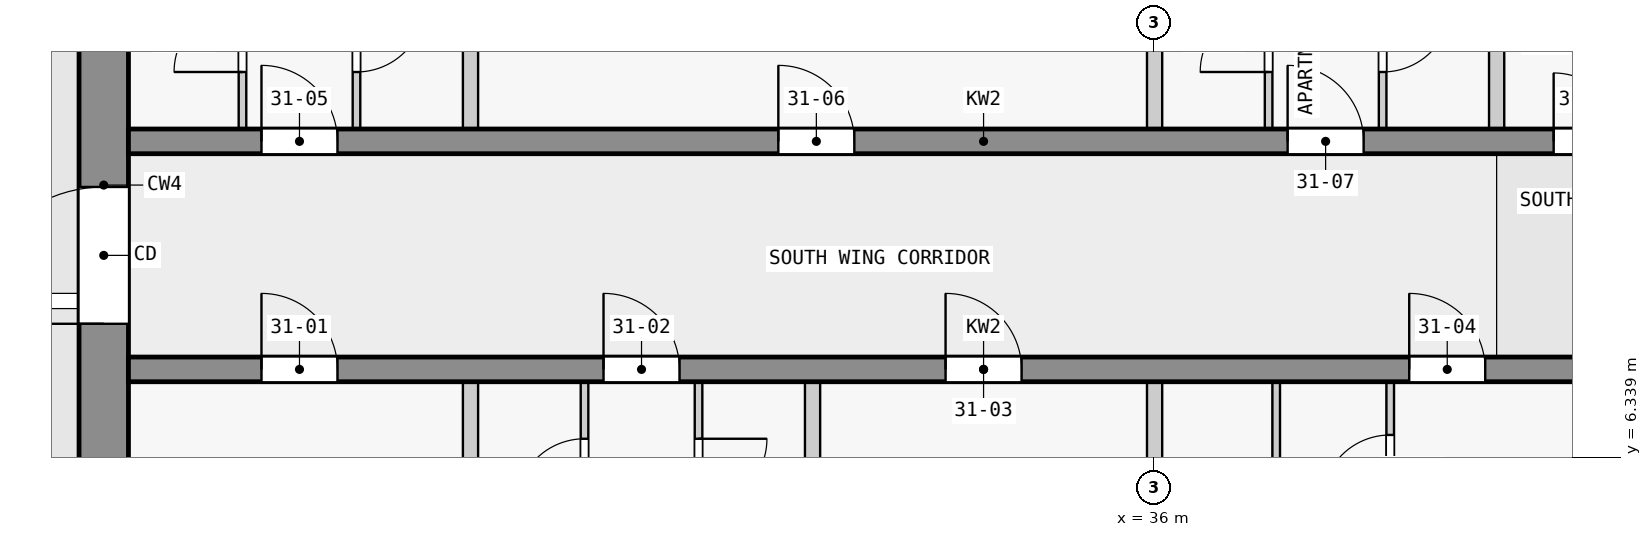
"""IFC4 building model, lengths in metres.
Left out: names, types, materials, properties, quantities, classifications, styles, units other than length and angle.
Written with IfcOpenShell. Run it as: python <this file> out.ifc"""

import sys

from ifc_helpers import new_model, si_unit, direction, frame, frame_2d, origin, place, context, subcontext, project, spatial, rectangle, extrude, element, fill, save


model = new_model("IFC4")
c1 = context("Model", 3, precision=1e-05, world=origin(), true_north=direction((0.0, 1.0)))
c2 = subcontext(c1, "Body", "Model", "MODEL_VIEW")
j1 = project(units=[si_unit("LENGTHUNIT", "METRE"), si_unit("PLANEANGLEUNIT", "RADIAN")], contexts=[c1])
p1 = place(None, origin())
s1 = spatial("IfcSite", under=j1, at=p1, CompositionType="ELEMENT")
p2 = place(p1, origin())
s2 = spatial("IfcBuilding", under=s1, at=p2, CompositionType="ELEMENT")
p3 = place(p2, frame((0.0, 0.0, 120.3)))
s3 = spatial("IfcBuildingStorey", under=s2, at=p3, CompositionType="ELEMENT", Elevation=120.3)
p4 = place(p3, frame((22.175, 2.5, 0.0), z_axis=(0.0, 0.0, 1.0), x_axis=(0.0, 1.0, 0.0)))
e1 = element("IfcWall", 1, at=p4, inside=s3, PredefinedType="SHEAR", context=c2, shape_type="SweptSolid", body=[
    extrude(rectangle(XDim=14.85, YDim=0.65, at=frame_2d((7.425, 0.0))), origin(), (0.0, 0.0, 1.0), 3.2),
])
p5 = place(p4, frame((5.6, 0.0, 0.0)))
e2 = element("IfcOpeningElement", 2, at=p5, cuts=e1, PredefinedType="OPENING", context=c2, shape_type="SweptSolid", body=[
    extrude(rectangle(XDim=1.8, YDim=2.1, at=frame_2d((0.9, 1.05))), frame((0.0, 0.335, 0.0), z_axis=(0.0, -1.0, 0.0), x_axis=(1.0, 0.0, 0.0)), (0.0, 0.0, 1.0), 0.67),
])
p6 = place(p3, frame((22.5, 7.5, 0.0), z_axis=(0.0, 0.0, 1.0), x_axis=(1.0, 0.0, 0.0)))
e3 = element("IfcWall", 3, at=p6, inside=s3, PredefinedType="SHEAR", context=c2, shape_type="SweptSolid", body=[
    extrude(rectangle(XDim=22.5, YDim=0.325, at=frame_2d((11.25, 0.0))), origin(), (0.0, 0.0, 1.0), 3.2),
])
p7 = place(p6, frame((1.75, 0.0, 0.0)))
e4 = element("IfcOpeningElement", 4, at=p7, cuts=e3, PredefinedType="OPENING", context=c2, shape_type="SweptSolid", body=[
    extrude(rectangle(XDim=1.0, YDim=2.1, at=frame_2d((0.5, 1.05))), frame((0.0, 0.172, 0.0), z_axis=(0.0, -1.0, 0.0), x_axis=(1.0, 0.0, 0.0)), (0.0, 0.0, 1.0), 0.345),
])
p8 = place(p6, frame((6.25, 0.0, 0.0)))
e5 = element("IfcOpeningElement", 5, at=p8, cuts=e3, PredefinedType="OPENING", context=c2, shape_type="SweptSolid", body=[
    extrude(rectangle(XDim=1.0, YDim=2.1, at=frame_2d((0.5, 1.05))), frame((0.0, 0.172, 0.0), z_axis=(0.0, -1.0, 0.0), x_axis=(1.0, 0.0, 0.0)), (0.0, 0.0, 1.0), 0.345),
])
p9 = place(p6, frame((10.75, 0.0, 0.0)))
e6 = element("IfcOpeningElement", 6, at=p9, cuts=e3, PredefinedType="OPENING", context=c2, shape_type="SweptSolid", body=[
    extrude(rectangle(XDim=1.0, YDim=2.1, at=frame_2d((0.5, 1.05))), frame((0.0, 0.172, 0.0), z_axis=(0.0, -1.0, 0.0), x_axis=(1.0, 0.0, 0.0)), (0.0, 0.0, 1.0), 0.345),
])
p10 = place(p6, frame((16.85, 0.0, 0.0)))
e7 = element("IfcOpeningElement", 7, at=p10, cuts=e3, PredefinedType="OPENING", context=c2, shape_type="SweptSolid", body=[
    extrude(rectangle(XDim=1.0, YDim=2.1, at=frame_2d((0.5, 1.05))), frame((0.0, 0.172, 0.0), z_axis=(0.0, -1.0, 0.0), x_axis=(1.0, 0.0, 0.0)), (0.0, 0.0, 1.0), 0.345),
])
p11 = place(p3, frame((22.5, 10.5, 0.0), z_axis=(0.0, 0.0, 1.0), x_axis=(1.0, 0.0, 0.0)))
e8 = element("IfcWall", 8, at=p11, inside=s3, PredefinedType="SHEAR", context=c2, shape_type="SweptSolid", body=[
    extrude(rectangle(XDim=22.5, YDim=0.325, at=frame_2d((11.25, 0.0))), origin(), (0.0, 0.0, 1.0), 3.2),
])
p12 = place(p11, frame((1.75, 0.0, 0.0)))
e9 = element("IfcOpeningElement", 9, at=p12, cuts=e8, PredefinedType="OPENING", context=c2, shape_type="SweptSolid", body=[
    extrude(rectangle(XDim=1.0, YDim=2.1, at=frame_2d((0.5, 1.05))), frame((0.0, 0.172, 0.0), z_axis=(0.0, -1.0, 0.0), x_axis=(1.0, 0.0, 0.0)), (0.0, 0.0, 1.0), 0.345),
])
p13 = place(p11, frame((8.55, 0.0, 0.0)))
e10 = element("IfcOpeningElement", 10, at=p13, cuts=e8, PredefinedType="OPENING", context=c2, shape_type="SweptSolid", body=[
    extrude(rectangle(XDim=1.0, YDim=2.1, at=frame_2d((0.5, 1.05))), frame((0.0, 0.172, 0.0), z_axis=(0.0, -1.0, 0.0), x_axis=(1.0, 0.0, 0.0)), (0.0, 0.0, 1.0), 0.345),
])
p14 = place(p11, frame((15.25, 0.0, 0.0)))
e11 = element("IfcOpeningElement", 11, at=p14, cuts=e8, PredefinedType="OPENING", context=c2, shape_type="SweptSolid", body=[
    extrude(rectangle(XDim=1.0, YDim=2.1, at=frame_2d((0.5, 1.05))), frame((0.0, 0.172, 0.0), z_axis=(0.0, -1.0, 0.0), x_axis=(1.0, 0.0, 0.0)), (0.0, 0.0, 1.0), 0.345),
])
p15 = place(p11, frame((18.75, 0.0, 0.0)))
e12 = element("IfcOpeningElement", 12, at=p15, cuts=e8, PredefinedType="OPENING", context=c2, shape_type="SweptSolid", body=[
    extrude(rectangle(XDim=0.9, YDim=2.1, at=frame_2d((0.45, 1.05))), frame((0.0, 0.172, 0.0), z_axis=(0.0, -1.0, 0.0), x_axis=(1.0, 0.0, 0.0)), (0.0, 0.0, 1.0), 0.345),
])
p16 = place(p11, frame((20.95, 0.0, 0.0)))
e13 = element("IfcOpeningElement", 13, at=p16, cuts=e8, PredefinedType="OPENING", context=c2, shape_type="SweptSolid", body=[
    extrude(rectangle(XDim=1.0, YDim=2.1, at=frame_2d((0.5, 1.05))), frame((0.0, 0.172, 0.0), z_axis=(0.0, -1.0, 0.0), x_axis=(1.0, 0.0, 0.0)), (0.0, 0.0, 1.0), 0.345),
])
p17 = place(p3, frame((24.0, 10.663, 0.0), z_axis=(0.0, 0.0, 1.0), x_axis=(0.0, 1.0, 0.0)))
e14 = element("IfcWall", 14, at=p17, inside=s3, PredefinedType="PARTITIONING", context=c2, shape_type="SweptSolid", body=[
    extrude(rectangle(XDim=2.4, YDim=0.1, at=frame_2d((1.2, 0.0))), origin(), (0.0, 0.0, 1.0), 3.2),
])
p18 = place(p17, frame((0.75, 0.0, 0.0)))
e15 = element("IfcOpeningElement", 15, at=p18, cuts=e14, PredefinedType="OPENING", context=c2, shape_type="SweptSolid", body=[
    extrude(rectangle(XDim=0.9, YDim=2.1, at=frame_2d((0.45, 1.05))), frame((0.0, 0.06, 0.0), z_axis=(0.0, -1.0, 0.0), x_axis=(1.0, 0.0, 0.0)), (0.0, 0.0, 1.0), 0.12),
])
p19 = place(p3, frame((25.5, 13.062, 0.0), z_axis=(0.0, 0.0, 1.0), x_axis=(0.0, -1.0, 0.0)))
e16 = element("IfcWall", 16, at=p19, inside=s3, PredefinedType="PARTITIONING", context=c2, shape_type="SweptSolid", body=[
    extrude(rectangle(XDim=2.4, YDim=0.1, at=frame_2d((1.2, 0.0))), origin(), (0.0, 0.0, 1.0), 3.2),
])
p20 = place(p19, frame((0.75, 0.0, 0.0)))
e17 = element("IfcOpeningElement", 17, at=p20, cuts=e16, PredefinedType="OPENING", context=c2, shape_type="SweptSolid", body=[
    extrude(rectangle(XDim=0.9, YDim=2.1, at=frame_2d((0.45, 1.05))), frame((0.0, 0.06, 0.0), z_axis=(0.0, -1.0, 0.0), x_axis=(1.0, 0.0, 0.0)), (0.0, 0.0, 1.0), 0.12),
])
p21 = place(p3, frame((27.0, 1.527, 0.0), z_axis=(0.0, 0.0, 1.0), x_axis=(0.0, 1.0, 0.0)))
e18 = element("IfcWall", 18, at=p21, inside=s3, PredefinedType="PARTITIONING", context=c2, shape_type="SweptSolid", body=[
    extrude(rectangle(XDim=5.811, YDim=0.2, at=frame_2d((2.905, 0.0))), origin(), (0.0, 0.0, 1.0), 3.2),
])
p22 = place(p3, frame((27.0, 10.663, 0.0), z_axis=(0.0, 0.0, 1.0), x_axis=(0.0, 1.0, 0.0)))
e19 = element("IfcWall", 19, at=p22, inside=s3, PredefinedType="PARTITIONING", context=c2, shape_type="SweptSolid", body=[
    extrude(rectangle(XDim=2.3, YDim=0.2, at=frame_2d((1.15, 0.0))), origin(), (0.0, 0.0, 1.0), 3.2),
])
p23 = place(p3, frame((28.5, 4.938, 0.0), z_axis=(0.0, 0.0, 1.0), x_axis=(0.0, 1.0, 0.0)))
e20 = element("IfcWall", 20, at=p23, inside=s3, PredefinedType="PARTITIONING", context=c2, shape_type="SweptSolid", body=[
    extrude(rectangle(XDim=2.4, YDim=0.1, at=frame_2d((1.2, 0.0))), origin(), (0.0, 0.0, 1.0), 3.2),
])
p24 = place(p23, frame((0.75, 0.0, 0.0)))
e21 = element("IfcOpeningElement", 21, at=p24, cuts=e20, PredefinedType="OPENING", context=c2, shape_type="SweptSolid", body=[
    extrude(rectangle(XDim=0.9, YDim=2.1, at=frame_2d((0.45, 1.05))), frame((0.0, 0.06, 0.0), z_axis=(0.0, -1.0, 0.0), x_axis=(1.0, 0.0, 0.0)), (0.0, 0.0, 1.0), 0.12),
])
p25 = place(p3, frame((30.0, 7.337, 0.0), z_axis=(0.0, 0.0, 1.0), x_axis=(0.0, -1.0, 0.0)))
e22 = element("IfcWall", 22, at=p25, inside=s3, PredefinedType="PARTITIONING", context=c2, shape_type="SweptSolid", body=[
    extrude(rectangle(XDim=2.4, YDim=0.1, at=frame_2d((1.2, 0.0))), origin(), (0.0, 0.0, 1.0), 3.2),
])
p26 = place(p25, frame((0.75, 0.0, 0.0)))
e23 = element("IfcOpeningElement", 23, at=p26, cuts=e22, PredefinedType="OPENING", context=c2, shape_type="SweptSolid", body=[
    extrude(rectangle(XDim=0.9, YDim=2.1, at=frame_2d((0.45, 1.05))), frame((0.0, 0.06, 0.0), z_axis=(0.0, -1.0, 0.0), x_axis=(1.0, 0.0, 0.0)), (0.0, 0.0, 1.0), 0.12),
])
p27 = place(p3, frame((31.5, 5.038, 0.0), z_axis=(0.0, 0.0, 1.0), x_axis=(0.0, 1.0, 0.0)))
e24 = element("IfcWall", 24, at=p27, inside=s3, PredefinedType="PARTITIONING", context=c2, shape_type="SweptSolid", body=[
    extrude(rectangle(XDim=2.3, YDim=0.2, at=frame_2d((1.15, 0.0))), origin(), (0.0, 0.0, 1.0), 3.2),
])
for number, where, z_axis, x_axis in (
    (25, (36.0, 1.4, 0.0), (0.0, 0.0, 1.0), (0.0, 1.0, 0.0)),
    (26, (36.0, 10.663, 0.0), (0.0, 0.0, 1.0), (0.0, 1.0, 0.0)),
):
    element("IfcWall", number, at=place(p3, frame(where, z_axis=z_axis, x_axis=x_axis)), inside=s3, PredefinedType="PARTITIONING", context=c2, shape_type="SweptSolid", body=[
        extrude(rectangle(XDim=5.938, YDim=0.2, at=frame_2d((2.969, 0.0))), origin(), (0.0, 0.0, 1.0), 3.2),
    ])
p28 = place(p3, frame((37.5, 10.663, 0.0), z_axis=(0.0, 0.0, 1.0), x_axis=(0.0, 1.0, 0.0)))
e27 = element("IfcWall", 27, at=p28, inside=s3, PredefinedType="PARTITIONING", context=c2, shape_type="SweptSolid", body=[
    extrude(rectangle(XDim=2.4, YDim=0.1, at=frame_2d((1.2, 0.0))), origin(), (0.0, 0.0, 1.0), 3.2),
])
p29 = place(p28, frame((0.75, 0.0, 0.0)))
e28 = element("IfcOpeningElement", 28, at=p29, cuts=e27, PredefinedType="OPENING", context=c2, shape_type="SweptSolid", body=[
    extrude(rectangle(XDim=0.9, YDim=2.1, at=frame_2d((0.45, 1.05))), frame((0.0, 0.06, 0.0), z_axis=(0.0, -1.0, 0.0), x_axis=(1.0, 0.0, 0.0)), (0.0, 0.0, 1.0), 0.12),
])
p30 = place(p3, frame((37.6, 4.988, 0.0), z_axis=(0.0, 0.0, 1.0), x_axis=(0.0, 1.0, 0.0)))
e29 = element("IfcWall", 29, at=p30, inside=s3, PredefinedType="PARTITIONING", context=c2, shape_type="SweptSolid", body=[
    extrude(rectangle(XDim=2.35, YDim=0.1, at=frame_2d((1.175, 0.0))), origin(), (0.0, 0.0, 1.0), 3.2),
])
p31 = place(p3, frame((39.0, 13.062, 0.0), z_axis=(0.0, 0.0, 1.0), x_axis=(0.0, -1.0, 0.0)))
e30 = element("IfcWall", 30, at=p31, inside=s3, PredefinedType="PARTITIONING", context=c2, shape_type="SweptSolid", body=[
    extrude(rectangle(XDim=2.4, YDim=0.1, at=frame_2d((1.2, 0.0))), origin(), (0.0, 0.0, 1.0), 3.2),
])
p32 = place(p31, frame((0.75, 0.0, 0.0)))
e31 = element("IfcOpeningElement", 31, at=p32, cuts=e30, PredefinedType="OPENING", context=c2, shape_type="SweptSolid", body=[
    extrude(rectangle(XDim=0.9, YDim=2.1, at=frame_2d((0.45, 1.05))), frame((0.0, 0.06, 0.0), z_axis=(0.0, -1.0, 0.0), x_axis=(1.0, 0.0, 0.0)), (0.0, 0.0, 1.0), 0.12),
])
p33 = place(p3, frame((39.1, 4.988, 0.0), z_axis=(0.0, 0.0, 1.0), x_axis=(0.0, 1.0, 0.0)))
e32 = element("IfcWall", 32, at=p33, inside=s3, PredefinedType="PARTITIONING", context=c2, shape_type="SweptSolid", body=[
    extrude(rectangle(XDim=2.35, YDim=0.1, at=frame_2d((1.175, 0.0))), origin(), (0.0, 0.0, 1.0), 3.2),
])
p34 = place(p33, frame((0.75, 0.0, 0.0)))
e33 = element("IfcOpeningElement", 33, at=p34, cuts=e32, PredefinedType="OPENING", context=c2, shape_type="SweptSolid", body=[
    extrude(rectangle(XDim=0.9, YDim=2.1, at=frame_2d((0.45, 1.05))), frame((0.0, 0.06, 0.0), z_axis=(0.0, -1.0, 0.0), x_axis=(1.0, 0.0, 0.0)), (0.0, 0.0, 1.0), 0.12),
])
p35 = place(p3, frame((40.5, 10.663, 0.0), z_axis=(0.0, 0.0, 1.0), x_axis=(0.0, 1.0, 0.0)))
e34 = element("IfcWall", 34, at=p35, inside=s3, PredefinedType="PARTITIONING", context=c2, shape_type="SweptSolid", body=[
    extrude(rectangle(XDim=2.3, YDim=0.2, at=frame_2d((1.15, 0.0))), origin(), (0.0, 0.0, 1.0), 3.2),
])
p36 = place(p5, origin())
e35 = element("IfcDoor", 35, at=p36, inside=s3, OperationType="DOUBLE_DOOR_SINGLE_SWING", PredefinedType="DOOR", context=c2, shape_type="SweptSolid", body=[
    extrude(rectangle(XDim=1.8, YDim=2.1, at=frame_2d((0.9, 1.05))), frame((0.0, 0.025, 0.0), z_axis=(0.0, -1.0, 0.0), x_axis=(1.0, 0.0, 0.0)), (0.0, 0.0, 1.0), 0.05),
])
fill(e2, e35)
p37 = place(p7, origin())
e36 = element("IfcDoor", 36, at=p37, inside=s3, OperationType="SINGLE_SWING_LEFT", PredefinedType="DOOR", context=c2, shape_type="SweptSolid", body=[
    extrude(rectangle(XDim=1.0, YDim=2.1, at=frame_2d((0.5, 1.05))), frame((0.0, 0.025, 0.0), z_axis=(0.0, -1.0, 0.0), x_axis=(1.0, 0.0, 0.0)), (0.0, 0.0, 1.0), 0.05),
])
fill(e4, e36)
p38 = place(p8, origin())
e37 = element("IfcDoor", 37, at=p38, inside=s3, OperationType="SINGLE_SWING_LEFT", PredefinedType="DOOR", context=c2, shape_type="SweptSolid", body=[
    extrude(rectangle(XDim=1.0, YDim=2.1, at=frame_2d((0.5, 1.05))), frame((0.0, 0.025, 0.0), z_axis=(0.0, -1.0, 0.0), x_axis=(1.0, 0.0, 0.0)), (0.0, 0.0, 1.0), 0.05),
])
fill(e5, e37)
p39 = place(p9, origin())
e38 = element("IfcDoor", 38, at=p39, inside=s3, OperationType="SINGLE_SWING_LEFT", PredefinedType="DOOR", context=c2, shape_type="SweptSolid", body=[
    extrude(rectangle(XDim=1.0, YDim=2.1, at=frame_2d((0.5, 1.05))), frame((0.0, 0.025, 0.0), z_axis=(0.0, -1.0, 0.0), x_axis=(1.0, 0.0, 0.0)), (0.0, 0.0, 1.0), 0.05),
])
fill(e6, e38)
p40 = place(p10, origin())
e39 = element("IfcDoor", 39, at=p40, inside=s3, OperationType="SINGLE_SWING_RIGHT", PredefinedType="DOOR", context=c2, shape_type="SweptSolid", body=[
    extrude(rectangle(XDim=1.0, YDim=2.1, at=frame_2d((0.5, 1.05))), frame((0.0, 0.025, 0.0), z_axis=(0.0, -1.0, 0.0), x_axis=(1.0, 0.0, 0.0)), (0.0, 0.0, 1.0), 0.05),
])
fill(e7, e39)
p41 = place(p12, origin())
e40 = element("IfcDoor", 40, at=p41, inside=s3, OperationType="SINGLE_SWING_LEFT", PredefinedType="DOOR", context=c2, shape_type="SweptSolid", body=[
    extrude(rectangle(XDim=1.0, YDim=2.1, at=frame_2d((0.5, 1.05))), frame((0.0, 0.025, 0.0), z_axis=(0.0, -1.0, 0.0), x_axis=(1.0, 0.0, 0.0)), (0.0, 0.0, 1.0), 0.05),
])
fill(e9, e40)
p42 = place(p13, origin())
e41 = element("IfcDoor", 41, at=p42, inside=s3, OperationType="SINGLE_SWING_LEFT", PredefinedType="DOOR", context=c2, shape_type="SweptSolid", body=[
    extrude(rectangle(XDim=1.0, YDim=2.1, at=frame_2d((0.5, 1.05))), frame((0.0, 0.025, 0.0), z_axis=(0.0, -1.0, 0.0), x_axis=(1.0, 0.0, 0.0)), (0.0, 0.0, 1.0), 0.05),
])
fill(e10, e41)
p43 = place(p14, origin())
e42 = element("IfcDoor", 42, at=p43, inside=s3, OperationType="SINGLE_SWING_RIGHT", PredefinedType="DOOR", context=c2, shape_type="SweptSolid", body=[
    extrude(rectangle(XDim=1.0, YDim=2.1, at=frame_2d((0.5, 1.05))), frame((0.0, 0.025, 0.0), z_axis=(0.0, -1.0, 0.0), x_axis=(1.0, 0.0, 0.0)), (0.0, 0.0, 1.0), 0.05),
])
fill(e11, e42)
p44 = place(p15, origin())
e43 = element("IfcDoor", 43, at=p44, inside=s3, OperationType="SINGLE_SWING_RIGHT", PredefinedType="DOOR", context=c2, shape_type="SweptSolid", body=[
    extrude(rectangle(XDim=0.9, YDim=2.1, at=frame_2d((0.45, 1.05))), frame((0.0, 0.025, 0.0), z_axis=(0.0, -1.0, 0.0), x_axis=(1.0, 0.0, 0.0)), (0.0, 0.0, 1.0), 0.05),
])
fill(e12, e43)
p45 = place(p24, origin())
e44 = element("IfcDoor", 44, at=p45, inside=s3, OperationType="SINGLE_SWING_LEFT", PredefinedType="DOOR", context=c2, shape_type="SweptSolid", body=[
    extrude(rectangle(XDim=0.9, YDim=2.1, at=frame_2d((0.45, 1.05))), frame((0.0, 0.025, 0.0), z_axis=(0.0, -1.0, 0.0), x_axis=(1.0, 0.0, 0.0)), (0.0, 0.0, 1.0), 0.05),
])
fill(e21, e44)
p46 = place(p26, origin())
e45 = element("IfcDoor", 45, at=p46, inside=s3, OperationType="SINGLE_SWING_LEFT", PredefinedType="DOOR", context=c2, shape_type="SweptSolid", body=[
    extrude(rectangle(XDim=0.9, YDim=2.1, at=frame_2d((0.45, 1.05))), frame((0.0, 0.025, 0.0), z_axis=(0.0, -1.0, 0.0), x_axis=(1.0, 0.0, 0.0)), (0.0, 0.0, 1.0), 0.05),
])
fill(e23, e45)
p47 = place(p34, origin())
e46 = element("IfcDoor", 46, at=p47, inside=s3, OperationType="SINGLE_SWING_RIGHT", PredefinedType="DOOR", context=c2, shape_type="SweptSolid", body=[
    extrude(rectangle(XDim=0.9, YDim=2.1, at=frame_2d((0.45, 1.05))), frame((0.0, 0.025, 0.0), z_axis=(0.0, -1.0, 0.0), x_axis=(1.0, 0.0, 0.0)), (0.0, 0.0, 1.0), 0.05),
])
fill(e33, e46)
p48 = place(p18, origin())
e47 = element("IfcDoor", 47, at=p48, inside=s3, OperationType="SINGLE_SWING_LEFT", PredefinedType="DOOR", context=c2, shape_type="SweptSolid", body=[
    extrude(rectangle(XDim=0.9, YDim=2.1, at=frame_2d((0.45, 1.05))), frame((0.0, 0.025, 0.0), z_axis=(0.0, -1.0, 0.0), x_axis=(1.0, 0.0, 0.0)), (0.0, 0.0, 1.0), 0.05),
])
fill(e15, e47)
p49 = place(p20, origin())
e48 = element("IfcDoor", 48, at=p49, inside=s3, OperationType="SINGLE_SWING_LEFT", PredefinedType="DOOR", context=c2, shape_type="SweptSolid", body=[
    extrude(rectangle(XDim=0.9, YDim=2.1, at=frame_2d((0.45, 1.05))), frame((0.0, 0.025, 0.0), z_axis=(0.0, -1.0, 0.0), x_axis=(1.0, 0.0, 0.0)), (0.0, 0.0, 1.0), 0.05),
])
fill(e17, e48)
p50 = place(p29, origin())
e49 = element("IfcDoor", 49, at=p50, inside=s3, OperationType="SINGLE_SWING_LEFT", PredefinedType="DOOR", context=c2, shape_type="SweptSolid", body=[
    extrude(rectangle(XDim=0.9, YDim=2.1, at=frame_2d((0.45, 1.05))), frame((0.0, 0.025, 0.0), z_axis=(0.0, -1.0, 0.0), x_axis=(1.0, 0.0, 0.0)), (0.0, 0.0, 1.0), 0.05),
])
fill(e28, e49)
p51 = place(p32, origin())
e50 = element("IfcDoor", 50, at=p51, inside=s3, OperationType="SINGLE_SWING_LEFT", PredefinedType="DOOR", context=c2, shape_type="SweptSolid", body=[
    extrude(rectangle(XDim=0.9, YDim=2.1, at=frame_2d((0.45, 1.05))), frame((0.0, 0.025, 0.0), z_axis=(0.0, -1.0, 0.0), x_axis=(1.0, 0.0, 0.0)), (0.0, 0.0, 1.0), 0.05),
])
fill(e31, e50)
save(model, sys.argv[1])
